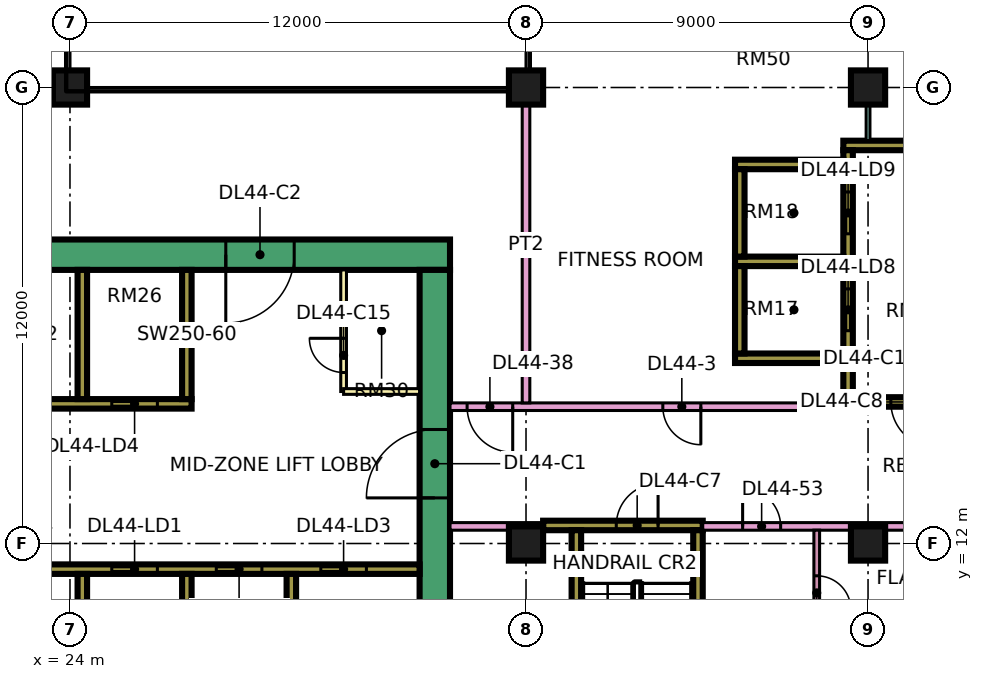
"""IFC4 building model, lengths in metres.
Left out: names, types, materials, properties, quantities, classifications, styles, units other than length and angle.
Written with IfcOpenShell. Run it as: python <this file> out.ifc"""

import sys

from ifc_helpers import new_model, si_unit, direction, frame, frame_2d, origin, origin_2d, place, context, subcontext, project, spatial, rectangle, extrude, element, fill, save


model = new_model("IFC4")
c1 = context("Model", 3, precision=1e-05, world=origin(), true_north=direction((0.0, 1.0)))
c2 = subcontext(c1, "Body", "Model", "MODEL_VIEW")
j1 = project(units=[si_unit("LENGTHUNIT", "METRE"), si_unit("PLANEANGLEUNIT", "RADIAN")], contexts=[c1])
p1 = place(None, origin())
s1 = spatial("IfcSite", under=j1, at=p1, CompositionType="ELEMENT")
p2 = place(p1, origin())
s2 = spatial("IfcBuilding", under=s1, at=p2, CompositionType="ELEMENT")
p3 = place(p2, frame((0.0, 0.0, 191.15)))
s3 = spatial("IfcBuildingStorey", under=s2, at=p3, CompositionType="ELEMENT", Elevation=191.15)
for number, where, z_axis, x_axis in (
    (1, (24.0, 24.0, 0.0), (0.0, 0.0, 1.0), (1.0, 0.0, 0.0)),
    (2, (36.0, 12.0, 0.0), (0.0, 0.0, 1.0), (1.0, 0.0, 0.0)),
    (3, (36.0, 24.0, 0.0), (0.0, 0.0, 1.0), (1.0, 0.0, 0.0)),
    (4, (45.0, 12.0, 0.0), (0.0, 0.0, 1.0), (1.0, 0.0, 0.0)),
    (5, (45.0, 24.0, 0.0), (0.0, 0.0, 1.0), (1.0, 0.0, 0.0)),
):
    element("IfcColumn", number, at=place(p3, frame(where, z_axis=z_axis, x_axis=x_axis)), inside=s3, PredefinedType="COLUMN", context=c2, shape_type="SweptSolid", body=[
        extrude(rectangle(XDim=0.9, YDim=0.9, at=origin_2d()), origin(), (0.0, 0.0, 1.0), 3.75),
    ])
p4 = place(p3, frame((9.0, 19.6, 0.0), z_axis=(0.0, 0.0, 1.0), x_axis=(1.0, 0.0, 0.0)))
e6 = element("IfcWall", 6, at=p4, inside=s3, PredefinedType="SHEAR", context=c2, shape_type="SweptSolid", body=[
    extrude(rectangle(XDim=25.0, YDim=0.8, at=frame_2d((12.5, 0.0))), origin(), (0.0, 0.0, 1.0), 3.75),
])
p5 = place(p4, frame((19.1, 0.0, 0.0)))
e7 = element("IfcOpeningElement", 7, at=p5, cuts=e6, PredefinedType="OPENING", context=c2, shape_type="SweptSolid", body=[
    extrude(rectangle(XDim=1.8, YDim=2.4, at=frame_2d((0.9, 1.2))), frame((0.0, 0.41, 0.0), z_axis=(0.0, -1.0, 0.0), x_axis=(1.0, 0.0, 0.0)), (0.0, 0.0, 1.0), 0.82),
])
p6 = place(p3, frame((33.6, 7.8, 0.0), z_axis=(0.0, 0.0, 1.0), x_axis=(0.0, 1.0, 0.0)))
e8 = element("IfcWall", 8, at=p6, inside=s3, PredefinedType="SHEAR", context=c2, shape_type="SweptSolid", body=[
    extrude(rectangle(XDim=11.4, YDim=0.8, at=frame_2d((5.7, 0.0))), origin(), (0.0, 0.0, 1.0), 3.75),
])
p7 = place(p6, frame((5.4, 0.0, 0.0)))
e9 = element("IfcOpeningElement", 9, at=p7, cuts=e8, PredefinedType="OPENING", context=c2, shape_type="SweptSolid", body=[
    extrude(rectangle(XDim=1.8, YDim=2.4, at=frame_2d((0.9, 1.2))), frame((0.0, 0.41, 0.0), z_axis=(0.0, -1.0, 0.0), x_axis=(1.0, 0.0, 0.0)), (0.0, 0.0, 1.0), 0.82),
])
p8 = place(p3, frame((13.45, 11.325, 0.0), z_axis=(0.0, 0.0, 1.0), x_axis=(1.0, 0.0, 0.0)))
e10 = element("IfcWall", 10, at=p8, inside=s3, PredefinedType="SHEAR", context=c2, shape_type="SweptSolid", body=[
    extrude(rectangle(XDim=19.75, YDim=0.25, at=frame_2d((9.875, 0.0))), origin(), (0.0, 0.0, 1.0), 3.75),
])
p9 = place(p8, frame((11.65, 0.0, 0.0)))
e11 = element("IfcOpeningElement", 11, at=p9, cuts=e10, PredefinedType="OPENING", context=c2, shape_type="SweptSolid", body=[
    extrude(rectangle(XDim=1.2, YDim=2.2, at=frame_2d((0.6, 1.1))), frame((0.0, 0.135, 0.0), z_axis=(0.0, -1.0, 0.0), x_axis=(1.0, 0.0, 0.0)), (0.0, 0.0, 1.0), 0.27),
])
p10 = place(p8, frame((14.4, 0.0, 0.0)))
e12 = element("IfcOpeningElement", 12, at=p10, cuts=e10, PredefinedType="OPENING", context=c2, shape_type="SweptSolid", body=[
    extrude(rectangle(XDim=1.2, YDim=2.2, at=frame_2d((0.6, 1.1))), frame((0.0, 0.135, 0.0), z_axis=(0.0, -1.0, 0.0), x_axis=(1.0, 0.0, 0.0)), (0.0, 0.0, 1.0), 0.27),
])
p11 = place(p8, frame((17.15, 0.0, 0.0)))
e13 = element("IfcOpeningElement", 13, at=p11, cuts=e10, PredefinedType="OPENING", context=c2, shape_type="SweptSolid", body=[
    extrude(rectangle(XDim=1.2, YDim=2.2, at=frame_2d((0.6, 1.1))), frame((0.0, 0.135, 0.0), z_axis=(0.0, -1.0, 0.0), x_axis=(1.0, 0.0, 0.0)), (0.0, 0.0, 1.0), 0.27),
])
p12 = place(p8, frame((1.55, 0.0, 0.0)))
e14 = element("IfcOpeningElement", 14, at=p12, cuts=e10, PredefinedType="OPENING", context=c2, shape_type="SweptSolid", body=[
    extrude(rectangle(XDim=0.9, YDim=2.1, at=frame_2d((0.45, 1.05))), frame((0.0, 0.135, 0.0), z_axis=(0.0, -1.0, 0.0), x_axis=(1.0, 0.0, 0.0)), (0.0, 0.0, 1.0), 0.27),
])
p13 = place(p8, frame((5.05, 0.0, 0.0)))
e15 = element("IfcOpeningElement", 15, at=p13, cuts=e10, PredefinedType="OPENING", context=c2, shape_type="SweptSolid", body=[
    extrude(rectangle(XDim=0.9, YDim=2.1, at=frame_2d((0.45, 1.05))), frame((0.0, 0.135, 0.0), z_axis=(0.0, -1.0, 0.0), x_axis=(1.0, 0.0, 0.0)), (0.0, 0.0, 1.0), 0.27),
])
p14 = place(p8, frame((8.425, 0.0, 0.0)))
e16 = element("IfcOpeningElement", 16, at=p14, cuts=e10, PredefinedType="OPENING", context=c2, shape_type="SweptSolid", body=[
    extrude(rectangle(XDim=0.9, YDim=2.1, at=frame_2d((0.45, 1.05))), frame((0.0, 0.135, 0.0), z_axis=(0.0, -1.0, 0.0), x_axis=(1.0, 0.0, 0.0)), (0.0, 0.0, 1.0), 0.27),
])
p15 = place(p3, frame((13.45, 15.675, 0.0), z_axis=(0.0, 0.0, 1.0), x_axis=(1.0, 0.0, 0.0)))
e17 = element("IfcWall", 17, at=p15, inside=s3, PredefinedType="SHEAR", context=c2, shape_type="SweptSolid", body=[
    extrude(rectangle(XDim=13.75, YDim=0.25, at=frame_2d((6.875, 0.0))), origin(), (0.0, 0.0, 1.0), 3.75),
])
p16 = place(p15, frame((11.65, 0.0, 0.0)))
e18 = element("IfcOpeningElement", 18, at=p16, cuts=e17, PredefinedType="OPENING", context=c2, shape_type="SweptSolid", body=[
    extrude(rectangle(XDim=1.2, YDim=2.2, at=frame_2d((0.6, 1.1))), frame((0.0, 0.135, 0.0), z_axis=(0.0, -1.0, 0.0), x_axis=(1.0, 0.0, 0.0)), (0.0, 0.0, 1.0), 0.27),
])
for number, where, z_axis, x_axis in (
    (19, (24.325, 7.8, 0.0), (0.0, 0.0, 1.0), (0.0, 1.0, 0.0)),
    (20, (27.075, 7.8, 0.0), (0.0, 0.0, 1.0), (0.0, 1.0, 0.0)),
    (21, (29.825, 7.8, 0.0), (0.0, 0.0, 1.0), (0.0, 1.0, 0.0)),
    (22, (24.325, 15.8, 0.0), (0.0, 0.0, 1.0), (0.0, 1.0, 0.0)),
    (23, (27.075, 15.8, 0.0), (0.0, 0.0, 1.0), (0.0, 1.0, 0.0)),
):
    element("IfcWall", number, at=place(p3, frame(where, z_axis=z_axis, x_axis=x_axis)), inside=s3, PredefinedType="SHEAR", context=c2, shape_type="SweptSolid", body=[
        extrude(rectangle(XDim=3.4, YDim=0.25, at=frame_2d((1.7, 0.0))), origin(), (0.0, 0.0, 1.0), 3.75),
    ])
p17 = place(p3, frame((36.45, 12.475, 0.0), z_axis=(0.0, 0.0, 1.0), x_axis=(1.0, 0.0, 0.0)))
e24 = element("IfcWall", 24, at=p17, inside=s3, PredefinedType="SHEAR", context=c2, shape_type="SweptSolid", body=[
    extrude(rectangle(XDim=4.2, YDim=0.25, at=frame_2d((2.1, 0.0))), origin(), (0.0, 0.0, 1.0), 3.75),
])
p18 = place(p17, frame((1.925, 0.0, 0.0)))
e25 = element("IfcOpeningElement", 25, at=p18, cuts=e24, PredefinedType="OPENING", context=c2, shape_type="SweptSolid", body=[
    extrude(rectangle(XDim=1.1, YDim=2.2, at=frame_2d((0.55, 1.1))), frame((0.0, 0.135, 0.0), z_axis=(0.0, -1.0, 0.0), x_axis=(1.0, 0.0, 0.0)), (0.0, 0.0, 1.0), 0.27),
])
for number, where, z_axis, x_axis in (
    (26, (37.325, 5.85, 0.0), (0.0, 0.0, 1.0), (0.0, 1.0, 0.0)),
    (27, (40.525, 5.85, 0.0), (0.0, 0.0, 1.0), (0.0, 1.0, 0.0)),
):
    element("IfcWall", number, at=place(p3, frame(where, z_axis=z_axis, x_axis=x_axis)), inside=s3, PredefinedType="SHEAR", context=c2, shape_type="SweptSolid", body=[
        extrude(rectangle(XDim=6.5, YDim=0.25, at=frame_2d((3.25, 0.0))), origin(), (0.0, 0.0, 1.0), 3.75),
    ])
p19 = place(p3, frame((44.35, 15.725, 0.0), z_axis=(0.0, 0.0, 1.0), x_axis=(1.0, 0.0, 0.0)))
e28 = element("IfcWall", 28, at=p19, inside=s3, PredefinedType="SHEAR", context=c2, shape_type="SweptSolid", body=[
    extrude(rectangle(XDim=3.425, YDim=0.25, at=frame_2d((1.712, 0.0))), origin(), (0.0, 0.0, 1.0), 3.75),
])
p20 = place(p19, frame((1.25, 0.0, 0.0)))
e29 = element("IfcOpeningElement", 29, at=p20, cuts=e28, PredefinedType="OPENING", context=c2, shape_type="SweptSolid", body=[
    extrude(rectangle(XDim=1.2, YDim=2.2, at=frame_2d((0.6, 1.1))), frame((0.0, 0.135, 0.0), z_axis=(0.0, -1.0, 0.0), x_axis=(1.0, 0.0, 0.0)), (0.0, 0.0, 1.0), 0.27),
])
p21 = place(p3, frame((44.35, 22.475, 0.0), z_axis=(0.0, 0.0, 1.0), x_axis=(1.0, 0.0, 0.0)))
e30 = element("IfcWall", 30, at=p21, inside=s3, PredefinedType="SHEAR", context=c2, shape_type="SweptSolid", body=[
    extrude(rectangle(XDim=3.425, YDim=0.25, at=frame_2d((1.712, 0.0))), origin(), (0.0, 0.0, 1.0), 3.75),
])
p22 = place(p3, frame((44.475, 15.85, 0.0), z_axis=(0.0, 0.0, 1.0), x_axis=(0.0, 1.0, 0.0)))
e31 = element("IfcWall", 31, at=p22, inside=s3, PredefinedType="SHEAR", context=c2, shape_type="SweptSolid", body=[
    extrude(rectangle(XDim=6.5, YDim=0.25, at=frame_2d((3.25, 0.0))), origin(), (0.0, 0.0, 1.0), 3.75),
])
p23 = place(p22, frame((1.75, 0.0, 0.0)))
e32 = element("IfcOpeningElement", 32, at=p23, cuts=e31, PredefinedType="OPENING", context=c2, shape_type="SweptSolid", body=[
    extrude(rectangle(XDim=1.1, YDim=2.2, at=frame_2d((0.55, 1.1))), frame((0.0, 0.135, 0.0), z_axis=(0.0, -1.0, 0.0), x_axis=(1.0, 0.0, 0.0)), (0.0, 0.0, 1.0), 0.27),
])
p24 = place(p22, frame((4.3, 0.0, 0.0)))
e33 = element("IfcOpeningElement", 33, at=p24, cuts=e31, PredefinedType="OPENING", context=c2, shape_type="SweptSolid", body=[
    extrude(rectangle(XDim=1.1, YDim=2.2, at=frame_2d((0.55, 1.1))), frame((0.0, 0.135, 0.0), z_axis=(0.0, -1.0, 0.0), x_axis=(1.0, 0.0, 0.0)), (0.0, 0.0, 1.0), 0.27),
])
for number, where, z_axis, x_axis in (
    (34, (41.5, 16.875, 0.0), (0.0, 0.0, 1.0), (1.0, 0.0, 0.0)),
    (35, (41.5, 19.425, 0.0), (0.0, 0.0, 1.0), (1.0, 0.0, 0.0)),
    (36, (41.5, 21.975, 0.0), (0.0, 0.0, 1.0), (1.0, 0.0, 0.0)),
):
    element("IfcWall", number, at=place(p3, frame(where, z_axis=z_axis, x_axis=x_axis)), inside=s3, PredefinedType="SHEAR", context=c2, shape_type="SweptSolid", body=[
        extrude(rectangle(XDim=2.85, YDim=0.25, at=frame_2d((1.425, 0.0))), origin(), (0.0, 0.0, 1.0), 3.75),
    ])
for number, where, z_axis, x_axis in (
    (37, (41.625, 17.0, 0.0), (0.0, 0.0, 1.0), (0.0, 1.0, 0.0)),
    (38, (41.625, 19.55, 0.0), (0.0, 0.0, 1.0), (0.0, 1.0, 0.0)),
):
    element("IfcWall", number, at=place(p3, frame(where, z_axis=z_axis, x_axis=x_axis)), inside=s3, PredefinedType="SHEAR", context=c2, shape_type="SweptSolid", body=[
        extrude(rectangle(XDim=2.3, YDim=0.25, at=frame_2d((1.15, 0.0))), origin(), (0.0, 0.0, 1.0), 3.75),
    ])
p25 = place(p3, frame((31.2, 16.0, 0.0), z_axis=(0.0, 0.0, 1.0), x_axis=(0.0, 1.0, 0.0)))
e39 = element("IfcWall", 39, at=p25, inside=s3, PredefinedType="PARTITIONING", context=c2, shape_type="SweptSolid", body=[
    extrude(rectangle(XDim=3.2, YDim=0.15, at=frame_2d((1.6, 0.0))), origin(), (0.0, 0.0, 1.0), 3.35),
])
p26 = place(p25, frame((0.5, 0.0, 0.0)))
e40 = element("IfcOpeningElement", 40, at=p26, cuts=e39, PredefinedType="OPENING", context=c2, shape_type="SweptSolid", body=[
    extrude(rectangle(XDim=0.9, YDim=2.1, at=frame_2d((0.45, 1.05))), frame((0.0, 0.085, 0.0), z_axis=(0.0, -1.0, 0.0), x_axis=(1.0, 0.0, 0.0)), (0.0, 0.0, 1.0), 0.17),
])
p27 = place(p3, frame((31.2, 16.0, 0.0), z_axis=(0.0, 0.0, 1.0), x_axis=(1.0, 0.0, 0.0)))
e41 = element("IfcWall", 41, at=p27, inside=s3, PredefinedType="PARTITIONING", context=c2, shape_type="SweptSolid", body=[
    extrude(rectangle(XDim=2.0, YDim=0.15, at=frame_2d((1.0, 0.0))), origin(), (0.0, 0.0, 1.0), 3.35),
])
p28 = place(p3, frame((34.0, 12.45, 0.0), z_axis=(0.0, 0.0, 1.0), x_axis=(1.0, 0.0, 0.0)))
e42 = element("IfcWall", 42, at=p28, inside=s3, PredefinedType="PARTITIONING", context=c2, shape_type="SweptSolid", body=[
    extrude(rectangle(XDim=2.451, YDim=0.2, at=frame_2d((1.226, 0.0))), origin(), (0.0, 0.0, 1.0), 3.35),
])
p29 = place(p3, frame((34.0, 15.6, 0.0), z_axis=(0.0, 0.0, 1.0), x_axis=(1.0, 0.0, 0.0)))
e43 = element("IfcWall", 43, at=p29, inside=s3, PredefinedType="PARTITIONING", context=c2, shape_type="SweptSolid", body=[
    extrude(rectangle(XDim=10.35, YDim=0.2, at=frame_2d((5.175, 0.0))), origin(), (0.0, 0.0, 1.0), 3.35),
])
p30 = place(p29, frame((5.6, 0.0, 0.0)))
e44 = element("IfcOpeningElement", 44, at=p30, cuts=e43, PredefinedType="OPENING", context=c2, shape_type="SweptSolid", body=[
    extrude(rectangle(XDim=1.0, YDim=2.1, at=frame_2d((0.5, 1.05))), frame((0.0, 0.11, 0.0), z_axis=(0.0, -1.0, 0.0), x_axis=(1.0, 0.0, 0.0)), (0.0, 0.0, 1.0), 0.22),
])
p31 = place(p29, frame((0.45, 0.0, 0.0)))
e45 = element("IfcOpeningElement", 45, at=p31, cuts=e43, PredefinedType="OPENING", context=c2, shape_type="SweptSolid", body=[
    extrude(rectangle(XDim=1.2, YDim=2.1, at=frame_2d((0.6, 1.05))), frame((0.0, 0.11, 0.0), z_axis=(0.0, -1.0, 0.0), x_axis=(1.0, 0.0, 0.0)), (0.0, 0.0, 1.0), 0.22),
])
p32 = place(p3, frame((36.0, 15.7, 0.0), z_axis=(0.0, 0.0, 1.0), x_axis=(0.0, 1.0, 0.0)))
e46 = element("IfcWall", 46, at=p32, inside=s3, PredefinedType="PARTITIONING", context=c2, shape_type="SweptSolid", body=[
    extrude(rectangle(XDim=8.3, YDim=0.2, at=frame_2d((4.15, 0.0))), origin(), (0.0, 0.0, 1.0), 3.35),
])
p33 = place(p3, frame((40.65, 12.45, 0.0), z_axis=(0.0, 0.0, 1.0), x_axis=(1.0, 0.0, 0.0)))
e47 = element("IfcWall", 47, at=p33, inside=s3, PredefinedType="PARTITIONING", context=c2, shape_type="SweptSolid", body=[
    extrude(rectangle(XDim=22.35, YDim=0.2, at=frame_2d((11.175, 0.0))), origin(), (0.0, 0.0, 1.0), 3.35),
])
p34 = place(p33, frame((10.8, 0.0, 0.0)))
e48 = element("IfcOpeningElement", 48, at=p34, cuts=e47, PredefinedType="OPENING", context=c2, shape_type="SweptSolid", body=[
    extrude(rectangle(XDim=1.0, YDim=2.1, at=frame_2d((0.5, 1.05))), frame((0.0, 0.11, 0.0), z_axis=(0.0, -1.0, 0.0), x_axis=(1.0, 0.0, 0.0)), (0.0, 0.0, 1.0), 0.22),
])
p35 = place(p33, frame((1.05, 0.0, 0.0)))
e49 = element("IfcOpeningElement", 49, at=p35, cuts=e47, PredefinedType="OPENING", context=c2, shape_type="SweptSolid", body=[
    extrude(rectangle(XDim=1.0, YDim=2.1, at=frame_2d((0.5, 1.05))), frame((0.0, 0.11, 0.0), z_axis=(0.0, -1.0, 0.0), x_axis=(1.0, 0.0, 0.0)), (0.0, 0.0, 1.0), 0.22),
])
p36 = place(p3, frame((43.65, 5.825, 0.0), z_axis=(0.0, 0.0, 1.0), x_axis=(0.0, 1.0, 0.0)))
e50 = element("IfcWall", 50, at=p36, inside=s3, PredefinedType="PARTITIONING", context=c2, shape_type="SweptSolid", body=[
    extrude(rectangle(XDim=6.525, YDim=0.15, at=frame_2d((3.263, 0.0))), origin(), (0.0, 0.0, 1.0), 3.35),
])
p37 = place(p36, frame((4.425, 0.0, 0.0)))
e51 = element("IfcOpeningElement", 51, at=p37, cuts=e50, PredefinedType="OPENING", context=c2, shape_type="SweptSolid", body=[
    extrude(rectangle(XDim=0.9, YDim=2.1, at=frame_2d((0.45, 1.05))), frame((0.0, 0.085, 0.0), z_axis=(0.0, -1.0, 0.0), x_axis=(1.0, 0.0, 0.0)), (0.0, 0.0, 1.0), 0.17),
])
p38 = place(p3, frame((45.0, 22.6, 0.0), z_axis=(0.0, 0.0, 1.0), x_axis=(0.0, 1.0, 0.0)))
e52 = element("IfcWall", 52, at=p38, inside=s3, PredefinedType="PARTITIONING", context=c2, shape_type="SweptSolid", body=[
    extrude(rectangle(XDim=1.4, YDim=0.1, at=frame_2d((0.7, 0.0))), origin(), (0.0, 0.0, 1.0), 3.35),
])
p39 = place(p9, origin())
e53 = element("IfcDoor", 53, at=p39, inside=s3, OperationType="DOUBLE_DOOR_SLIDING", PredefinedType="DOOR", context=c2, shape_type="SweptSolid", body=[
    extrude(rectangle(XDim=1.2, YDim=2.2, at=frame_2d((0.6, 1.1))), frame((0.0, 0.025, 0.0), z_axis=(0.0, -1.0, 0.0), x_axis=(1.0, 0.0, 0.0)), (0.0, 0.0, 1.0), 0.05),
])
fill(e11, e53)
p40 = place(p10, origin())
e54 = element("IfcDoor", 54, at=p40, inside=s3, OperationType="DOUBLE_DOOR_SLIDING", PredefinedType="DOOR", context=c2, shape_type="SweptSolid", body=[
    extrude(rectangle(XDim=1.2, YDim=2.2, at=frame_2d((0.6, 1.1))), frame((0.0, 0.025, 0.0), z_axis=(0.0, -1.0, 0.0), x_axis=(1.0, 0.0, 0.0)), (0.0, 0.0, 1.0), 0.05),
])
fill(e12, e54)
p41 = place(p11, origin())
e55 = element("IfcDoor", 55, at=p41, inside=s3, OperationType="DOUBLE_DOOR_SLIDING", PredefinedType="DOOR", context=c2, shape_type="SweptSolid", body=[
    extrude(rectangle(XDim=1.2, YDim=2.2, at=frame_2d((0.6, 1.1))), frame((0.0, 0.025, 0.0), z_axis=(0.0, -1.0, 0.0), x_axis=(1.0, 0.0, 0.0)), (0.0, 0.0, 1.0), 0.05),
])
fill(e13, e55)
p42 = place(p16, origin())
e56 = element("IfcDoor", 56, at=p42, inside=s3, OperationType="DOUBLE_DOOR_SLIDING", PredefinedType="DOOR", context=c2, shape_type="SweptSolid", body=[
    extrude(rectangle(XDim=1.2, YDim=2.2, at=frame_2d((0.6, 1.1))), frame((0.0, 0.025, 0.0), z_axis=(0.0, -1.0, 0.0), x_axis=(1.0, 0.0, 0.0)), (0.0, 0.0, 1.0), 0.05),
])
fill(e18, e56)
p43 = place(p7, origin())
e57 = element("IfcDoor", 57, at=p43, inside=s3, OperationType="DOUBLE_DOOR_SINGLE_SWING", PredefinedType="DOOR", context=c2, shape_type="SweptSolid", body=[
    extrude(rectangle(XDim=1.8, YDim=2.4, at=frame_2d((0.9, 1.2))), frame((0.0, 0.025, 0.0), z_axis=(0.0, -1.0, 0.0), x_axis=(1.0, 0.0, 0.0)), (0.0, 0.0, 1.0), 0.05),
])
fill(e9, e57)
p44 = place(p5, frame((1.8, 0.0, 0.0), z_axis=(0.0, 0.0, 1.0), x_axis=(-1.0, 0.0, 0.0)))
e58 = element("IfcDoor", 58, at=p44, inside=s3, OperationType="DOUBLE_DOOR_SINGLE_SWING", PredefinedType="DOOR", context=c2, shape_type="SweptSolid", body=[
    extrude(rectangle(XDim=1.8, YDim=2.4, at=frame_2d((0.9, 1.2))), frame((0.0, 0.025, 0.0), z_axis=(0.0, -1.0, 0.0), x_axis=(1.0, 0.0, 0.0)), (0.0, 0.0, 1.0), 0.05),
])
fill(e7, e58)
p45 = place(p18, frame((1.1, 0.0, 0.0), z_axis=(0.0, 0.0, 1.0), x_axis=(-1.0, 0.0, 0.0)))
e59 = element("IfcDoor", 59, at=p45, inside=s3, OperationType="SINGLE_SWING_RIGHT", PredefinedType="DOOR", context=c2, shape_type="SweptSolid", body=[
    extrude(rectangle(XDim=1.1, YDim=2.2, at=frame_2d((0.55, 1.1))), frame((0.0, 0.025, 0.0), z_axis=(0.0, -1.0, 0.0), x_axis=(1.0, 0.0, 0.0)), (0.0, 0.0, 1.0), 0.05),
])
fill(e25, e59)
p46 = place(p20, origin())
e60 = element("IfcDoor", 60, at=p46, inside=s3, OperationType="SINGLE_SWING_RIGHT", PredefinedType="DOOR", context=c2, shape_type="SweptSolid", body=[
    extrude(rectangle(XDim=1.2, YDim=2.2, at=frame_2d((0.6, 1.1))), frame((0.0, 0.025, 0.0), z_axis=(0.0, -1.0, 0.0), x_axis=(1.0, 0.0, 0.0)), (0.0, 0.0, 1.0), 0.05),
])
fill(e29, e60)
p47 = place(p23, origin())
e61 = element("IfcDoor", 61, at=p47, inside=s3, OperationType="DOUBLE_DOOR_SLIDING", PredefinedType="DOOR", context=c2, shape_type="SweptSolid", body=[
    extrude(rectangle(XDim=1.1, YDim=2.2, at=frame_2d((0.55, 1.1))), frame((0.0, 0.025, 0.0), z_axis=(0.0, -1.0, 0.0), x_axis=(1.0, 0.0, 0.0)), (0.0, 0.0, 1.0), 0.05),
])
fill(e32, e61)
p48 = place(p24, origin())
e62 = element("IfcDoor", 62, at=p48, inside=s3, OperationType="DOUBLE_DOOR_SLIDING", PredefinedType="DOOR", context=c2, shape_type="SweptSolid", body=[
    extrude(rectangle(XDim=1.1, YDim=2.2, at=frame_2d((0.55, 1.1))), frame((0.0, 0.025, 0.0), z_axis=(0.0, -1.0, 0.0), x_axis=(1.0, 0.0, 0.0)), (0.0, 0.0, 1.0), 0.05),
])
fill(e33, e62)
p49 = place(p26, frame((0.9, 0.0, 0.0), z_axis=(0.0, 0.0, 1.0), x_axis=(-1.0, 0.0, 0.0)))
e63 = element("IfcDoor", 63, at=p49, inside=s3, OperationType="SINGLE_SWING_RIGHT", PredefinedType="DOOR", context=c2, shape_type="SweptSolid", body=[
    extrude(rectangle(XDim=0.9, YDim=2.1, at=frame_2d((0.45, 1.05))), frame((0.0, 0.025, 0.0), z_axis=(0.0, -1.0, 0.0), x_axis=(1.0, 0.0, 0.0)), (0.0, 0.0, 1.0), 0.05),
])
fill(e40, e63)
p50 = place(p30, origin())
e64 = element("IfcDoor", 64, at=p50, inside=s3, OperationType="SINGLE_SWING_RIGHT", PredefinedType="DOOR", context=c2, shape_type="SweptSolid", body=[
    extrude(rectangle(XDim=1.0, YDim=2.1, at=frame_2d((0.5, 1.05))), frame((0.0, 0.025, 0.0), z_axis=(0.0, -1.0, 0.0), x_axis=(1.0, 0.0, 0.0)), (0.0, 0.0, 1.0), 0.05),
])
fill(e44, e64)
p51 = place(p31, origin())
e65 = element("IfcDoor", 65, at=p51, inside=s3, OperationType="SINGLE_SWING_RIGHT", PredefinedType="DOOR", context=c2, shape_type="SweptSolid", body=[
    extrude(rectangle(XDim=1.2, YDim=2.1, at=frame_2d((0.6, 1.05))), frame((0.0, 0.025, 0.0), z_axis=(0.0, -1.0, 0.0), x_axis=(1.0, 0.0, 0.0)), (0.0, 0.0, 1.0), 0.05),
])
fill(e45, e65)
p52 = place(p35, origin())
e66 = element("IfcDoor", 66, at=p52, inside=s3, OperationType="SINGLE_SWING_LEFT", PredefinedType="DOOR", context=c2, shape_type="SweptSolid", body=[
    extrude(rectangle(XDim=1.0, YDim=2.1, at=frame_2d((0.5, 1.05))), frame((0.0, 0.025, 0.0), z_axis=(0.0, -1.0, 0.0), x_axis=(1.0, 0.0, 0.0)), (0.0, 0.0, 1.0), 0.05),
])
fill(e49, e66)
p53 = place(p37, frame((0.9, 0.0, 0.0), z_axis=(0.0, 0.0, 1.0), x_axis=(-1.0, 0.0, 0.0)))
e67 = element("IfcDoor", 67, at=p53, inside=s3, OperationType="SINGLE_SWING_LEFT", PredefinedType="DOOR", context=c2, shape_type="SweptSolid", body=[
    extrude(rectangle(XDim=0.9, YDim=2.1, at=frame_2d((0.45, 1.05))), frame((0.0, 0.025, 0.0), z_axis=(0.0, -1.0, 0.0), x_axis=(1.0, 0.0, 0.0)), (0.0, 0.0, 1.0), 0.05),
])
fill(e51, e67)
save(model, sys.argv[1])
